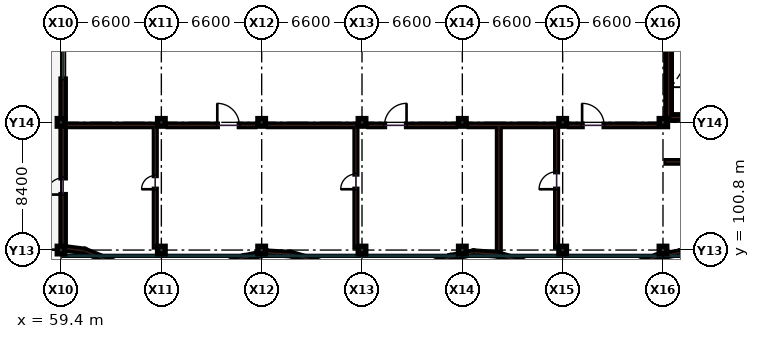
"""IFC4 building model, lengths in metres.
Left out: names, types, materials, properties, quantities, classifications, styles, units other than length and angle.
Written with IfcOpenShell. Run it as: python <this file> out.ifc"""

import sys

from ifc_helpers import new_model, si_unit, direction, frame, frame_2d, origin, origin_2d, place, context, subcontext, project, spatial, rectangle, extrude, element, fill, save


model = new_model("IFC4")
c1 = context("Model", 3, precision=1e-05, world=origin(), true_north=direction((0.0, 1.0)))
c2 = subcontext(c1, "Body", "Model", "MODEL_VIEW")
j1 = project(units=[si_unit("LENGTHUNIT", "METRE"), si_unit("PLANEANGLEUNIT", "RADIAN")], contexts=[c1])
p1 = place(None, origin())
s1 = spatial("IfcSite", under=j1, at=p1, CompositionType="ELEMENT")
p2 = place(p1, origin())
s2 = spatial("IfcBuilding", under=s1, at=p2, CompositionType="ELEMENT")
p3 = place(p2, frame((0.0, 0.0, 22.8)))
s3 = spatial("IfcBuildingStorey", under=s2, at=p3, CompositionType="ELEMENT", Elevation=22.8)
for number, where, z_axis, x_axis in (
    (1, (59.4, 100.8, 0.0), (0.0, 0.0, 1.0), (1.0, 0.0, 0.0)),
    (2, (59.4, 109.2, 0.0), (0.0, 0.0, 1.0), (1.0, 0.0, 0.0)),
    (3, (66.0, 100.8, 0.0), (0.0, 0.0, 1.0), (1.0, 0.0, 0.0)),
    (4, (66.0, 109.2, 0.0), (0.0, 0.0, 1.0), (1.0, 0.0, 0.0)),
    (5, (72.6, 100.8, 0.0), (0.0, 0.0, 1.0), (1.0, 0.0, 0.0)),
    (6, (72.6, 109.2, 0.0), (0.0, 0.0, 1.0), (1.0, 0.0, 0.0)),
    (7, (79.2, 100.8, 0.0), (0.0, 0.0, 1.0), (1.0, 0.0, 0.0)),
    (8, (79.2, 109.2, 0.0), (0.0, 0.0, 1.0), (1.0, 0.0, 0.0)),
    (9, (85.8, 100.8, 0.0), (0.0, 0.0, 1.0), (1.0, 0.0, 0.0)),
    (10, (85.8, 109.2, 0.0), (0.0, 0.0, 1.0), (1.0, 0.0, 0.0)),
    (11, (92.4, 100.8, 0.0), (0.0, 0.0, 1.0), (1.0, 0.0, 0.0)),
    (12, (92.4, 109.2, 0.0), (0.0, 0.0, 1.0), (1.0, 0.0, 0.0)),
    (13, (99.0, 100.8, 0.0), (0.0, 0.0, 1.0), (1.0, 0.0, 0.0)),
    (14, (99.0, 109.2, 0.0), (0.0, 0.0, 1.0), (1.0, 0.0, 0.0)),
):
    element("IfcColumn", number, at=place(p3, frame(where, z_axis=z_axis, x_axis=x_axis)), inside=s3, PredefinedType="COLUMN", context=c2, shape_type="SweptSolid", body=[
        extrude(rectangle(XDim=0.5, YDim=0.5, at=origin_2d()), origin(), (0.0, 0.0, 1.0), 4.2),
    ])
p4 = place(p3, frame((59.68, 109.0, 0.0), z_axis=(0.0, 0.0, 1.0), x_axis=(1.0, 0.0, 0.0)))
e15 = element("IfcWall", 15, at=p4, inside=s3, PredefinedType="PARTITIONING", context=c2, shape_type="SweptSolid", body=[
    extrude(rectangle(XDim=5.87, YDim=0.16, at=frame_2d((2.935, 0.0))), origin(), (0.0, 0.0, 1.0), 3.195),
])
p5 = place(p3, frame((66.45, 109.0, 0.0), z_axis=(0.0, 0.0, 1.0), x_axis=(1.0, 0.0, 0.0)))
e16 = element("IfcWall", 16, at=p5, inside=s3, PredefinedType="PARTITIONING", context=c2, shape_type="SweptSolid", body=[
    extrude(rectangle(XDim=5.7, YDim=0.16, at=frame_2d((2.85, 0.0))), origin(), (0.0, 0.0, 1.0), 3.195),
])
p6 = place(p5, frame((3.23, 0.0, 0.0)))
e17 = element("IfcOpeningElement", 17, at=p6, cuts=e16, PredefinedType="OPENING", context=c2, shape_type="SweptSolid", body=[
    extrude(rectangle(XDim=1.45, YDim=2.25, at=frame_2d((0.725, 1.125))), frame((0.0, 0.09, 0.0), z_axis=(0.0, -1.0, 0.0), x_axis=(1.0, 0.0, 0.0)), (0.0, 0.0, 1.0), 0.18),
])
p7 = place(p3, frame((73.05, 109.0, 0.0), z_axis=(0.0, 0.0, 1.0), x_axis=(1.0, 0.0, 0.0)))
e18 = element("IfcWall", 18, at=p7, inside=s3, PredefinedType="PARTITIONING", context=c2, shape_type="SweptSolid", body=[
    extrude(rectangle(XDim=5.7, YDim=0.16, at=frame_2d((2.85, 0.0))), origin(), (0.0, 0.0, 1.0), 3.195),
])
p8 = place(p3, frame((79.65, 109.0, 0.0), z_axis=(0.0, 0.0, 1.0), x_axis=(1.0, 0.0, 0.0)))
e19 = element("IfcWall", 19, at=p8, inside=s3, PredefinedType="PARTITIONING", context=c2, shape_type="SweptSolid", body=[
    extrude(rectangle(XDim=5.7, YDim=0.16, at=frame_2d((2.85, 0.0))), origin(), (0.0, 0.0, 1.0), 3.195),
])
p9 = place(p8, frame((1.03, 0.0, 0.0)))
e20 = element("IfcOpeningElement", 20, at=p9, cuts=e19, PredefinedType="OPENING", context=c2, shape_type="SweptSolid", body=[
    extrude(rectangle(XDim=1.45, YDim=2.25, at=frame_2d((0.725, 1.125))), frame((0.0, 0.09, 0.0), z_axis=(0.0, -1.0, 0.0), x_axis=(1.0, 0.0, 0.0)), (0.0, 0.0, 1.0), 0.18),
])
p10 = place(p3, frame((86.25, 109.0, 0.0), z_axis=(0.0, 0.0, 1.0), x_axis=(1.0, 0.0, 0.0)))
e21 = element("IfcWall", 21, at=p10, inside=s3, PredefinedType="PARTITIONING", context=c2, shape_type="SweptSolid", body=[
    extrude(rectangle(XDim=5.7, YDim=0.16, at=frame_2d((2.85, 0.0))), origin(), (0.0, 0.0, 1.0), 3.195),
])
p11 = place(p3, frame((92.85, 109.0, 0.0), z_axis=(0.0, 0.0, 1.0), x_axis=(1.0, 0.0, 0.0)))
e22 = element("IfcWall", 22, at=p11, inside=s3, PredefinedType="PARTITIONING", context=c2, shape_type="SweptSolid", body=[
    extrude(rectangle(XDim=6.45, YDim=0.16, at=frame_2d((3.225, 0.0))), origin(), (0.0, 0.0, 1.0), 3.195),
])
p12 = place(p11, frame((0.83, 0.0, 0.0)))
e23 = element("IfcOpeningElement", 23, at=p12, cuts=e22, PredefinedType="OPENING", context=c2, shape_type="SweptSolid", body=[
    extrude(rectangle(XDim=1.45, YDim=2.25, at=frame_2d((0.725, 1.125))), frame((0.0, 0.09, 0.0), z_axis=(0.0, -1.0, 0.0), x_axis=(1.0, 0.0, 0.0)), (0.0, 0.0, 1.0), 0.18),
])
p13 = place(p3, frame((88.2, 100.8, 0.0), z_axis=(0.0, 0.0, 1.0), x_axis=(0.0, 1.0, 0.0)))
e24 = element("IfcWall", 24, at=p13, inside=s3, PredefinedType="SOLIDWALL", context=c2, shape_type="SweptSolid", body=[
    extrude(rectangle(XDim=8.2, YDim=0.18, at=frame_2d((4.1, 0.0))), origin(), (0.0, 0.0, 1.0), 3.23),
])
p14 = place(p3, frame((65.6, 101.0, 0.0), z_axis=(0.0, 0.0, 1.0), x_axis=(0.0, 1.0, 0.0)))
e25 = element("IfcWall", 25, at=p14, inside=s3, PredefinedType="PARTITIONING", context=c2, shape_type="SweptSolid", body=[
    extrude(rectangle(XDim=8.0, YDim=0.12, at=frame_2d((4.0, 0.0))), origin(), (0.0, 0.0, 1.0), 3.23),
])
p15 = place(p14, frame((3.8, 0.0, 0.0)))
e26 = element("IfcOpeningElement", 26, at=p15, cuts=e25, PredefinedType="OPENING", context=c2, shape_type="SweptSolid", body=[
    extrude(rectangle(XDim=0.9, YDim=2.1, at=frame_2d((0.45, 1.05))), frame((0.0, 0.07, 0.0), z_axis=(0.0, -1.0, 0.0), x_axis=(1.0, 0.0, 0.0)), (0.0, 0.0, 1.0), 0.14),
])
p16 = place(p3, frame((78.8, 101.0, 0.0), z_axis=(0.0, 0.0, 1.0), x_axis=(0.0, 1.0, 0.0)))
e27 = element("IfcWall", 27, at=p16, inside=s3, PredefinedType="PARTITIONING", context=c2, shape_type="SweptSolid", body=[
    extrude(rectangle(XDim=8.0, YDim=0.12, at=frame_2d((4.0, 0.0))), origin(), (0.0, 0.0, 1.0), 3.23),
])
p17 = place(p16, frame((3.8, 0.0, 0.0)))
e28 = element("IfcOpeningElement", 28, at=p17, cuts=e27, PredefinedType="OPENING", context=c2, shape_type="SweptSolid", body=[
    extrude(rectangle(XDim=1.0, YDim=2.2, at=frame_2d((0.5, 1.1))), frame((0.0, 0.07, 0.0), z_axis=(0.0, -1.0, 0.0), x_axis=(1.0, 0.0, 0.0)), (0.0, 0.0, 1.0), 0.14),
])
p18 = place(p3, frame((92.0, 101.0, 0.0), z_axis=(0.0, 0.0, 1.0), x_axis=(0.0, 1.0, 0.0)))
e29 = element("IfcWall", 29, at=p18, inside=s3, PredefinedType="PARTITIONING", context=c2, shape_type="SweptSolid", body=[
    extrude(rectangle(XDim=8.0, YDim=0.12, at=frame_2d((4.0, 0.0))), origin(), (0.0, 0.0, 1.0), 3.23),
])
p19 = place(p18, frame((3.8, 0.0, 0.0)))
e30 = element("IfcOpeningElement", 30, at=p19, cuts=e29, PredefinedType="OPENING", context=c2, shape_type="SweptSolid", body=[
    extrude(rectangle(XDim=1.15, YDim=2.2, at=frame_2d((0.575, 1.1))), frame((0.0, 0.07, 0.0), z_axis=(0.0, -1.0, 0.0), x_axis=(1.0, 0.0, 0.0)), (0.0, 0.0, 1.0), 0.14),
])
p20 = place(p3, frame((99.2, 106.6, 0.0), z_axis=(0.0, 0.0, 1.0), x_axis=(1.0, 0.0, 0.0)))
e31 = element("IfcWall", 31, at=p20, inside=s3, PredefinedType="PARTITIONING", context=c2, shape_type="SweptSolid", body=[
    extrude(rectangle(XDim=12.9, YDim=0.16, at=frame_2d((6.45, 0.0))), origin(), (0.0, 0.0, 1.0), 3.23),
])
p21 = place(p20, frame((4.2, 0.0, 0.0)))
e32 = element("IfcOpeningElement", 32, at=p21, cuts=e31, PredefinedType="OPENING", context=c2, shape_type="SweptSolid", body=[
    extrude(rectangle(XDim=1.05, YDim=2.15, at=frame_2d((0.525, 1.075))), frame((0.0, 0.09, 0.0), z_axis=(0.0, -1.0, 0.0), x_axis=(1.0, 0.0, 0.0)), (0.0, 0.0, 1.0), 0.18),
])
p22 = place(p3, frame((59.54, 108.955, 0.0), z_axis=(0.0, 0.0, 1.0), x_axis=(0.0, -1.0, 0.0)))
e33 = element("IfcWall", 33, at=p22, inside=s3, PredefinedType="SOLIDWALL", context=c2, shape_type="SweptSolid", body=[
    extrude(rectangle(XDim=7.91, YDim=0.28, at=frame_2d((3.955, 0.0))), origin(), (0.0, 0.0, 1.0), 3.245),
])
p23 = place(p22, frame((3.405, 0.0, 0.0)))
e34 = element("IfcOpeningElement", 34, at=p23, cuts=e33, PredefinedType="OPENING", context=c2, shape_type="SweptSolid", body=[
    extrude(rectangle(XDim=1.1, YDim=2.2, at=frame_2d((0.55, 1.1))), frame((0.0, 0.15, 0.0), z_axis=(0.0, -1.0, 0.0), x_axis=(1.0, 0.0, 0.0)), (0.0, 0.0, 1.0), 0.3),
])
p24 = place(p3, frame((59.54, 117.355, 0.0), z_axis=(0.0, 0.0, 1.0), x_axis=(0.0, -1.0, 0.0)))
e35 = element("IfcWall", 35, at=p24, inside=s3, PredefinedType="SOLIDWALL", context=c2, shape_type="SweptSolid", body=[
    extrude(rectangle(XDim=7.91, YDim=0.28, at=frame_2d((3.955, 0.0))), origin(), (0.0, 0.0, 1.0), 3.395),
])
p25 = place(p24, frame((2.605, 0.0, 0.95)))
e36 = element("IfcOpeningElement", 36, at=p25, cuts=e35, PredefinedType="OPENING", context=c2, shape_type="SweptSolid", body=[
    extrude(rectangle(XDim=2.7, YDim=2.05, at=frame_2d((1.35, 1.025))), frame((0.0, 0.15, 0.0), z_axis=(0.0, -1.0, 0.0), x_axis=(1.0, 0.0, 0.0)), (0.0, 0.0, 1.0), 0.3),
])
p26 = place(p3, frame((59.42, 100.94, 0.0), z_axis=(0.0, 0.0, 1.0), x_axis=(0.9917791796, -0.127961161733, 0.0)))
e37 = element("IfcWall", 37, at=p26, inside=s3, PredefinedType="SOLIDWALL", context=c2, shape_type="SweptSolid", body=[
    extrude(rectangle(XDim=1.522, YDim=0.22, at=frame_2d((0.761, 0.0))), origin(), (0.0, 0.0, 1.0), 1.45),
])
p27 = place(p3, frame((60.965, 100.735, 0.0), z_axis=(0.0, 0.0, 1.0), x_axis=(0.924578660971, -0.380991206824, 0.0)))
e38 = element("IfcWall", 38, at=p27, inside=s3, PredefinedType="SOLIDWALL", context=c2, shape_type="SweptSolid", body=[
    extrude(rectangle(XDim=1.628, YDim=0.22, at=frame_2d((0.814, 0.0))), origin(), (0.0, 0.0, 1.0), 1.45),
])
p28 = place(p3, frame((62.465, 100.115, 0.0), z_axis=(0.0, 0.0, 1.0), x_axis=(0.933489457338, -0.358604842463, 0.0)))
e39 = element("IfcWall", 39, at=p28, inside=s3, PredefinedType="SOLIDWALL", context=c2, shape_type="SweptSolid", body=[
    extrude(rectangle(XDim=1.618, YDim=0.22, at=frame_2d((0.809, 0.0))), origin(), (0.0, 0.0, 1.0), 1.45),
])
p29 = place(p3, frame((69.91, 99.745, 0.0), z_axis=(0.0, 0.0, 1.0), x_axis=(0.937637162141, 0.347615523491, 0.0)))
e40 = element("IfcWall", 40, at=p29, inside=s3, PredefinedType="SOLIDWALL", context=c2, shape_type="SweptSolid", body=[
    extrude(rectangle(XDim=1.61, YDim=0.22, at=frame_2d((0.805, 0.0))), origin(), (0.0, 0.0, 1.0), 1.45),
])
p30 = place(p3, frame((71.44, 100.31, 0.0), z_axis=(0.0, 0.0, 1.0), x_axis=(0.980088467878, 0.198561313281, 0.0)))
e41 = element("IfcWall", 41, at=p30, inside=s3, PredefinedType="SOLIDWALL", context=c2, shape_type="SweptSolid", body=[
    extrude(rectangle(XDim=1.536, YDim=0.22, at=frame_2d((0.768, 0.0))), origin(), (0.0, 0.0, 1.0), 1.45),
])
p31 = place(p3, frame((72.985, 100.62, 0.0), z_axis=(0.0, 0.0, 1.0), x_axis=(0.998411797522, -0.056337221881, 0.0)))
e42 = element("IfcWall", 42, at=p31, inside=s3, PredefinedType="SOLIDWALL", context=c2, shape_type="SweptSolid", body=[
    extrude(rectangle(XDim=1.512, YDim=0.22, at=frame_2d((0.756, 0.0))), origin(), (0.0, 0.0, 1.0), 1.45),
])
p32 = place(p3, frame((74.525, 100.53, 0.0), z_axis=(0.0, 0.0, 1.0), x_axis=(0.960911858265, -0.276854475575, 0.0)))
e43 = element("IfcWall", 43, at=p32, inside=s3, PredefinedType="SOLIDWALL", context=c2, shape_type="SweptSolid", body=[
    extrude(rectangle(XDim=1.572, YDim=0.22, at=frame_2d((0.786, 0.0))), origin(), (0.0, 0.0, 1.0), 1.45),
])
p33 = place(p3, frame((83.485, 99.775, 0.0), z_axis=(0.0, 0.0, 1.0), x_axis=(0.939602550045, 0.342267509337, 0.0)))
e44 = element("IfcWall", 44, at=p33, inside=s3, PredefinedType="SOLIDWALL", context=c2, shape_type="SweptSolid", body=[
    extrude(rectangle(XDim=1.607, YDim=0.22, at=frame_2d((0.804, 0.0))), origin(), (0.0, 0.0, 1.0), 1.45),
])
p34 = place(p3, frame((85.02, 100.33, 0.0), z_axis=(0.0, 0.0, 1.0), x_axis=(0.98145565631, 0.19168931816, 0.0)))
e45 = element("IfcWall", 45, at=p34, inside=s3, PredefinedType="SOLIDWALL", context=c2, shape_type="SweptSolid", body=[
    extrude(rectangle(XDim=1.539, YDim=0.22, at=frame_2d((0.769, 0.0))), origin(), (0.0, 0.0, 1.0), 1.45),
])
p35 = place(p3, frame((86.565, 100.63, 0.0), z_axis=(0.0, 0.0, 1.0), x_axis=(0.997363695451, -0.072564860623, 0.0)))
e46 = element("IfcWall", 46, at=p35, inside=s3, PredefinedType="SOLIDWALL", context=c2, shape_type="SweptSolid", body=[
    extrude(rectangle(XDim=1.514, YDim=0.22, at=frame_2d((0.757, 0.0))), origin(), (0.0, 0.0, 1.0), 1.45),
])
p36 = place(p3, frame((88.105, 100.515, 0.0), z_axis=(0.0, 0.0, 1.0), x_axis=(0.958103864289, -0.286420993006, 0.0)))
e47 = element("IfcWall", 47, at=p36, inside=s3, PredefinedType="SOLIDWALL", context=c2, shape_type="SweptSolid", body=[
    extrude(rectangle(XDim=1.571, YDim=0.22, at=frame_2d((0.786, 0.0))), origin(), (0.0, 0.0, 1.0), 1.45),
])
p37 = place(p3, frame((97.07, 99.81, 0.0), z_axis=(0.0, 0.0, 1.0), x_axis=(0.941593715183, 0.336751058688, 0.0)))
e48 = element("IfcWall", 48, at=p37, inside=s3, PredefinedType="SOLIDWALL", context=c2, shape_type="SweptSolid", body=[
    extrude(rectangle(XDim=1.604, YDim=0.22, at=frame_2d((0.802, 0.0))), origin(), (0.0, 0.0, 1.0), 1.45),
])
p38 = place(p3, frame((98.6, 100.36, 0.0), z_axis=(0.0, 0.0, 1.0), x_axis=(0.984308919427, 0.176453821539, 0.0)))
e49 = element("IfcWall", 49, at=p38, inside=s3, PredefinedType="SOLIDWALL", context=c2, shape_type="SweptSolid", body=[
    extrude(rectangle(XDim=1.529, YDim=0.22, at=frame_2d((0.764, 0.0))), origin(), (0.0, 0.0, 1.0), 1.45),
])
p39 = place(p3, frame((99.37, 109.34, 0.0), z_axis=(0.0, 0.0, 1.0), x_axis=(0.0, 1.0, 0.0)))
e50 = element("IfcWall", 50, at=p39, inside=s3, PredefinedType="SHEAR", context=c2, shape_type="SweptSolid", body=[
    extrude(rectangle(XDim=8.09, YDim=0.36, at=frame_2d((4.045, 0.0))), origin(), (0.0, 0.0, 1.0), 3.96),
])
p40 = place(p3, frame((99.55, 109.52, 0.0), z_axis=(0.0, 0.0, 1.0), x_axis=(1.0, 0.0, 0.0)))
e51 = element("IfcWall", 51, at=p40, inside=s3, PredefinedType="SHEAR", context=c2, shape_type="SweptSolid", body=[
    extrude(rectangle(XDim=3.8, YDim=0.36, at=frame_2d((1.9, 0.0))), origin(), (0.0, 0.0, 1.0), 3.96),
])
p41 = place(p6, origin())
e52 = element("IfcDoor", 52, at=p41, inside=s3, OperationType="SINGLE_SWING_LEFT", PredefinedType="DOOR", context=c2, shape_type="SweptSolid", body=[
    extrude(rectangle(XDim=1.45, YDim=2.25, at=frame_2d((0.725, 1.125))), frame((0.0, 0.025, 0.0), z_axis=(0.0, -1.0, 0.0), x_axis=(1.0, 0.0, 0.0)), (0.0, 0.0, 1.0), 0.05),
])
fill(e17, e52)
p42 = place(p9, origin())
e53 = element("IfcDoor", 53, at=p42, inside=s3, OperationType="SINGLE_SWING_RIGHT", PredefinedType="DOOR", context=c2, shape_type="SweptSolid", body=[
    extrude(rectangle(XDim=1.45, YDim=2.25, at=frame_2d((0.725, 1.125))), frame((0.0, 0.025, 0.0), z_axis=(0.0, -1.0, 0.0), x_axis=(1.0, 0.0, 0.0)), (0.0, 0.0, 1.0), 0.05),
])
fill(e20, e53)
p43 = place(p12, origin())
e54 = element("IfcDoor", 54, at=p43, inside=s3, OperationType="SINGLE_SWING_LEFT", PredefinedType="DOOR", context=c2, shape_type="SweptSolid", body=[
    extrude(rectangle(XDim=1.45, YDim=2.25, at=frame_2d((0.725, 1.125))), frame((0.0, 0.025, 0.0), z_axis=(0.0, -1.0, 0.0), x_axis=(1.0, 0.0, 0.0)), (0.0, 0.0, 1.0), 0.05),
])
fill(e23, e54)
p44 = place(p15, origin())
e55 = element("IfcDoor", 55, at=p44, inside=s3, OperationType="SINGLE_SWING_LEFT", PredefinedType="DOOR", context=c2, shape_type="SweptSolid", body=[
    extrude(rectangle(XDim=0.9, YDim=2.1, at=frame_2d((0.45, 1.05))), frame((0.0, 0.025, 0.0), z_axis=(0.0, -1.0, 0.0), x_axis=(1.0, 0.0, 0.0)), (0.0, 0.0, 1.0), 0.05),
])
fill(e26, e55)
p45 = place(p17, origin())
e56 = element("IfcDoor", 56, at=p45, inside=s3, OperationType="SINGLE_SWING_LEFT", PredefinedType="DOOR", context=c2, shape_type="SweptSolid", body=[
    extrude(rectangle(XDim=1.0, YDim=2.2, at=frame_2d((0.5, 1.1))), frame((0.0, 0.025, 0.0), z_axis=(0.0, -1.0, 0.0), x_axis=(1.0, 0.0, 0.0)), (0.0, 0.0, 1.0), 0.05),
])
fill(e28, e56)
p46 = place(p19, origin())
e57 = element("IfcDoor", 57, at=p46, inside=s3, OperationType="SINGLE_SWING_LEFT", PredefinedType="DOOR", context=c2, shape_type="SweptSolid", body=[
    extrude(rectangle(XDim=1.15, YDim=2.2, at=frame_2d((0.575, 1.1))), frame((0.0, 0.025, 0.0), z_axis=(0.0, -1.0, 0.0), x_axis=(1.0, 0.0, 0.0)), (0.0, 0.0, 1.0), 0.05),
])
fill(e30, e57)
p47 = place(p23, frame((1.1, 0.0, 0.0), z_axis=(0.0, 0.0, 1.0), x_axis=(-1.0, 0.0, 0.0)))
e58 = element("IfcDoor", 58, at=p47, inside=s3, OperationType="SINGLE_SWING_RIGHT", PredefinedType="DOOR", context=c2, shape_type="SweptSolid", body=[
    extrude(rectangle(XDim=1.1, YDim=2.2, at=frame_2d((0.55, 1.1))), frame((0.0, 0.025, 0.0), z_axis=(0.0, -1.0, 0.0), x_axis=(1.0, 0.0, 0.0)), (0.0, 0.0, 1.0), 0.05),
])
fill(e34, e58)
p48 = place(p25, origin())
e59 = element("IfcWindow", 59, at=p48, inside=s3, PartitioningType="SINGLE_PANEL", PredefinedType="WINDOW", context=c2, shape_type="SweptSolid", body=[
    extrude(rectangle(XDim=2.7, YDim=2.05, at=frame_2d((1.35, 1.025))), frame((0.0, 0.03, 0.0), z_axis=(0.0, -1.0, 0.0), x_axis=(1.0, 0.0, 0.0)), (0.0, 0.0, 1.0), 0.06),
])
fill(e36, e59)
save(model, sys.argv[1])
